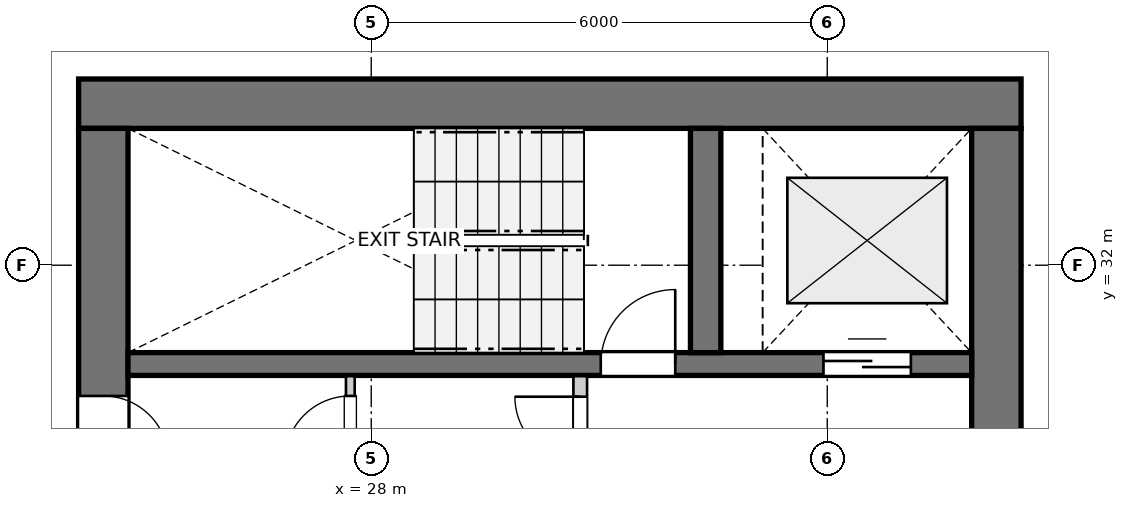
"""IFC4 building model, lengths in metres.
Left out: names, types, materials, properties, quantities, classifications, styles, units other than length and angle.
Written with IfcOpenShell. Run it as: python <this file> out.ifc"""

import sys

from ifc_helpers import new_model, si_unit, direction, frame, frame_2d, origin, place, context, subcontext, project, spatial, rectangle, extrude, source, transform, mapped, element, fill, save


model = new_model("IFC4")
c1 = context("Model", 3, precision=1e-05, world=origin(), true_north=direction((0.0, 1.0)))
c2 = subcontext(c1, "Body", "Model", "MODEL_VIEW")
j1 = project(units=[si_unit("LENGTHUNIT", "METRE"), si_unit("PLANEANGLEUNIT", "RADIAN")], contexts=[c1])
p1 = place(None, origin())
s1 = spatial("IfcSite", under=j1, at=p1, CompositionType="ELEMENT")
p2 = place(p1, origin())
s2 = spatial("IfcBuilding", under=s1, at=p2, CompositionType="ELEMENT")
p3 = place(p2, frame((0.0, 0.0, 112.0)))
s3 = spatial("IfcBuildingStorey", under=s2, at=p3, CompositionType="ELEMENT", Elevation=112.0)
p4 = place(p3, frame((36.55, 34.125, 0.0), z_axis=(0.0, 0.0, 1.0), x_axis=(-1.0, 0.0, 0.0)))
e1 = element("IfcWall", 1, at=p4, inside=s3, PredefinedType="SHEAR", context=c2, shape_type="SweptSolid", body=[
    extrude(rectangle(XDim=12.4, YDim=0.65, at=frame_2d((6.2, 0.0))), origin(), (0.0, 0.0, 1.0), 2.935),
])
p5 = place(p3, frame((24.475, 33.8, 0.0), z_axis=(0.0, 0.0, 1.0), x_axis=(0.0, -1.0, 0.0)))
e2 = element("IfcWall", 2, at=p5, inside=s3, PredefinedType="SHEAR", context=c2, shape_type="SweptSolid", body=[
    extrude(rectangle(XDim=15.6, YDim=0.65, at=frame_2d((7.8, 0.0))), origin(), (0.0, 0.0, 1.0), 2.935),
])
p6 = place(p5, frame((7.05, 0.0, 0.0)))
e3 = element("IfcOpeningElement", 3, at=p6, cuts=e2, PredefinedType="OPENING", context=c2, shape_type="SweptSolid", body=[
    extrude(rectangle(XDim=1.5, YDim=2.15, at=frame_2d((0.75, 1.075))), frame((0.0, 0.335, 0.0), z_axis=(0.0, -1.0, 0.0), x_axis=(1.0, 0.0, 0.0)), (0.0, 0.0, 1.0), 0.67),
])
p7 = place(p5, frame((3.52, 0.0, 0.0)))
e4 = element("IfcOpeningElement", 4, at=p7, cuts=e2, PredefinedType="OPENING", context=c2, shape_type="SweptSolid", body=[
    extrude(rectangle(XDim=0.86, YDim=2.05, at=frame_2d((0.43, 1.025))), frame((0.0, 0.335, 0.0), z_axis=(0.0, -1.0, 0.0), x_axis=(1.0, 0.0, 0.0)), (0.0, 0.0, 1.0), 0.67),
])
p8 = place(p5, frame((11.22, 0.0, 0.0)))
e5 = element("IfcOpeningElement", 5, at=p8, cuts=e2, PredefinedType="OPENING", context=c2, shape_type="SweptSolid", body=[
    extrude(rectangle(XDim=0.86, YDim=2.05, at=frame_2d((0.43, 1.025))), frame((0.0, 0.335, 0.0), z_axis=(0.0, -1.0, 0.0), x_axis=(1.0, 0.0, 0.0)), (0.0, 0.0, 1.0), 0.67),
])
p9 = place(p3, frame((36.225, 18.2, 0.0), z_axis=(0.0, 0.0, 1.0), x_axis=(0.0, 1.0, 0.0)))
e6 = element("IfcWall", 6, at=p9, inside=s3, PredefinedType="SHEAR", context=c2, shape_type="SweptSolid", body=[
    extrude(rectangle(XDim=15.6, YDim=0.65, at=frame_2d((7.8, 0.0))), origin(), (0.0, 0.0, 1.0), 2.935),
])
p10 = place(p9, frame((4.25, 0.0, 0.0)))
e7 = element("IfcOpeningElement", 7, at=p10, cuts=e6, PredefinedType="OPENING", context=c2, shape_type="SweptSolid", body=[
    extrude(rectangle(XDim=1.1, YDim=2.15, at=frame_2d((0.55, 1.075))), frame((0.0, 0.335, 0.0), z_axis=(0.0, -1.0, 0.0), x_axis=(1.0, 0.0, 0.0)), (0.0, 0.0, 1.0), 0.67),
])
p11 = place(p9, frame((10.25, 0.0, 0.0)))
e8 = element("IfcOpeningElement", 8, at=p11, cuts=e6, PredefinedType="OPENING", context=c2, shape_type="SweptSolid", body=[
    extrude(rectangle(XDim=1.1, YDim=2.15, at=frame_2d((0.55, 1.075))), frame((0.0, 0.335, 0.0), z_axis=(0.0, -1.0, 0.0), x_axis=(1.0, 0.0, 0.0)), (0.0, 0.0, 1.0), 0.67),
])
p12 = place(p3, frame((24.8, 30.7, 0.0), z_axis=(0.0, 0.0, 1.0), x_axis=(1.0, 0.0, 0.0)))
e9 = element("IfcWall", 9, at=p12, inside=s3, PredefinedType="SHEAR", context=c2, shape_type="SweptSolid", body=[
    extrude(rectangle(XDim=11.1, YDim=0.3, at=frame_2d((5.55, 0.0))), origin(), (0.0, 0.0, 1.0), 2.935),
])
p13 = place(p12, frame((6.22, 0.0, 0.0)))
e10 = element("IfcOpeningElement", 10, at=p13, cuts=e9, PredefinedType="OPENING", context=c2, shape_type="SweptSolid", body=[
    extrude(rectangle(XDim=0.98, YDim=2.15, at=frame_2d((0.49, 1.075))), frame((0.0, 0.16, 0.0), z_axis=(0.0, -1.0, 0.0), x_axis=(1.0, 0.0, 0.0)), (0.0, 0.0, 1.0), 0.32),
])
p14 = place(p12, frame((9.15, 0.0, 0.0)))
e11 = element("IfcOpeningElement", 11, at=p14, cuts=e9, PredefinedType="OPENING", context=c2, shape_type="SweptSolid", body=[
    extrude(rectangle(XDim=1.15, YDim=2.15, at=frame_2d((0.575, 1.075))), frame((0.0, 0.16, 0.0), z_axis=(0.0, -1.0, 0.0), x_axis=(1.0, 0.0, 0.0)), (0.0, 0.0, 1.0), 0.32),
])
p15 = place(p3, frame((32.4, 30.85, 0.0), z_axis=(0.0, 0.0, 1.0), x_axis=(0.0, 1.0, 0.0)))
e12 = element("IfcWall", 12, at=p15, inside=s3, PredefinedType="SHEAR", context=c2, shape_type="SweptSolid", body=[
    extrude(rectangle(XDim=2.95, YDim=0.4, at=frame_2d((1.475, 0.0))), origin(), (0.0, 0.0, 1.0), 2.935),
])
p16 = place(p3, frame((30.75, 27.43, 0.0), z_axis=(0.0, 0.0, 1.0), x_axis=(0.0, 1.0, 0.0)))
e13 = element("IfcWall", 13, at=p16, inside=s3, PredefinedType="PARTITIONING", context=c2, shape_type="SweptSolid", body=[
    extrude(rectangle(XDim=3.11, YDim=0.18, at=frame_2d((1.555, 0.0))), origin(), (0.0, 0.0, 1.0), 2.935),
])
p17 = place(p16, frame((1.98, 0.0, 0.0)))
e14 = element("IfcOpeningElement", 14, at=p17, cuts=e13, PredefinedType="OPENING", context=c2, shape_type="SweptSolid", body=[
    extrude(rectangle(XDim=0.86, YDim=2.05, at=frame_2d((0.43, 1.025))), frame((0.0, 0.1, 0.0), z_axis=(0.0, -1.0, 0.0), x_axis=(1.0, 0.0, 0.0)), (0.0, 0.0, 1.0), 0.2),
])
p18 = place(p3, frame((27.725, 29.16, 0.0), z_axis=(0.0, 0.0, 1.0), x_axis=(0.0, 1.0, 0.0)))
e15 = element("IfcWall", 15, at=p18, inside=s3, PredefinedType="PARTITIONING", context=c2, shape_type="SweptSolid", body=[
    extrude(rectangle(XDim=1.38, YDim=0.115, at=frame_2d((0.69, 0.0))), origin(), (0.0, 0.0, 1.0), 2.935),
])
p19 = place(p18, frame((0.26, 0.0, 0.0)))
e16 = element("IfcOpeningElement", 16, at=p19, cuts=e15, PredefinedType="OPENING", context=c2, shape_type="SweptSolid", body=[
    extrude(rectangle(XDim=0.86, YDim=2.05, at=frame_2d((0.43, 1.025))), frame((0.0, 0.067, 0.0), z_axis=(0.0, -1.0, 0.0), x_axis=(1.0, 0.0, 0.0)), (0.0, 0.0, 1.0), 0.135),
])
m1 = source(origin(), c2, "Body", "SweptSolid", [
    extrude(rectangle(XDim=0.98, YDim=2.15, at=frame_2d((0.49, 1.075))), frame((0.0, 0.025, 0.0), z_axis=(0.0, -1.0, 0.0), x_axis=(1.0, 0.0, 0.0)), (0.0, 0.0, 1.0), 0.05),
])
p20 = place(p13, origin())
e17 = element("IfcDoor", 17, at=p20, inside=s3, OperationType="SINGLE_SWING_RIGHT", PredefinedType="DOOR", context=c2, shape_type="MappedRepresentation", body=[
    mapped(m1, transform((0.0, 0.0, 0.0), x_axis=(1.0, 0.0, 0.0), y_axis=(0.0, 1.0, 0.0), z_axis=(0.0, 0.0, 1.0), scale=1.0)),
])
fill(e10, e17)
m2 = source(origin(), c2, "Body", "SweptSolid", [
    extrude(rectangle(XDim=1.15, YDim=2.15, at=frame_2d((0.575, 1.075))), frame((0.0, 0.025, 0.0), z_axis=(0.0, -1.0, 0.0), x_axis=(1.0, 0.0, 0.0)), (0.0, 0.0, 1.0), 0.05),
])
p21 = place(p14, origin())
e18 = element("IfcDoor", 18, at=p21, inside=s3, OperationType="DOUBLE_DOOR_SLIDING", PredefinedType="DOOR", context=c2, shape_type="MappedRepresentation", body=[
    mapped(m2, transform((0.0, 0.0, 0.0), x_axis=(1.0, 0.0, 0.0), y_axis=(0.0, 1.0, 0.0), z_axis=(0.0, 0.0, 1.0), scale=1.0)),
])
fill(e11, e18)
m3 = source(origin(), c2, "Body", "SweptSolid", [
    extrude(rectangle(XDim=0.86, YDim=2.05, at=frame_2d((0.43, 1.025))), frame((0.0, 0.025, 0.0), z_axis=(0.0, -1.0, 0.0), x_axis=(1.0, 0.0, 0.0)), (0.0, 0.0, 1.0), 0.05),
])
p22 = place(p7, origin())
e19 = element("IfcDoor", 19, at=p22, inside=s3, OperationType="SINGLE_SWING_RIGHT", PredefinedType="DOOR", context=c2, shape_type="MappedRepresentation", body=[
    mapped(m3, transform((0.0, 0.0, 0.0), x_axis=(1.0, 0.0, 0.0), y_axis=(0.0, 1.0, 0.0), z_axis=(0.0, 0.0, 1.0), scale=1.0)),
])
fill(e4, e19)
p23 = place(p17, origin())
e20 = element("IfcDoor", 20, at=p23, inside=s3, OperationType="SINGLE_SWING_RIGHT", PredefinedType="DOOR", context=c2, shape_type="MappedRepresentation", body=[
    mapped(m3, transform((0.0, 0.0, 0.0), x_axis=(1.0, 0.0, 0.0), y_axis=(0.0, 1.0, 0.0), z_axis=(0.0, 0.0, 1.0), scale=1.0)),
])
fill(e14, e20)
p24 = place(p19, origin())
e21 = element("IfcDoor", 21, at=p24, inside=s3, OperationType="SINGLE_SWING_LEFT", PredefinedType="DOOR", context=c2, shape_type="MappedRepresentation", body=[
    mapped(m3, transform((0.0, 0.0, 0.0), x_axis=(1.0, 0.0, 0.0), y_axis=(0.0, 1.0, 0.0), z_axis=(0.0, 0.0, 1.0), scale=1.0)),
])
fill(e16, e21)
save(model, sys.argv[1])
